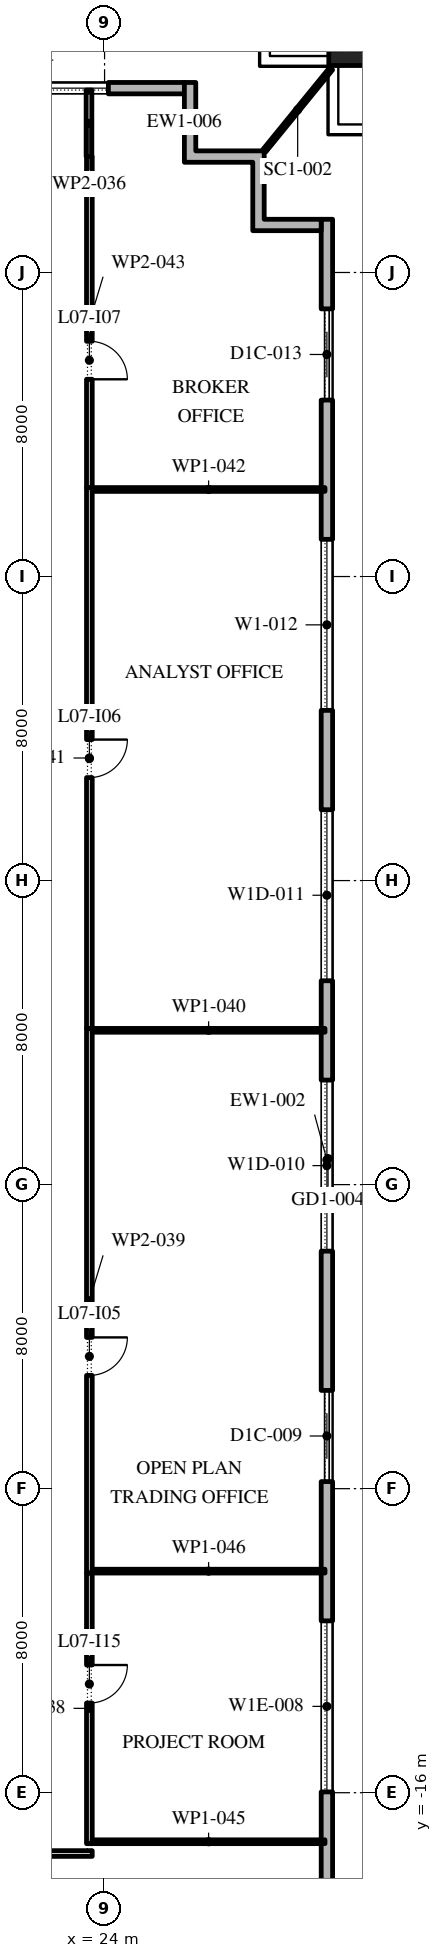
"""IFC4 building model, lengths in metres.
Left out: names, types, materials, properties, quantities, classifications, styles, units other than length and angle.
Written with IfcOpenShell. Run it as: python <this file> out.ifc"""

import sys

from ifc_helpers import new_model, si_unit, direction, frame, frame_2d, origin, origin_2d, place, context, subcontext, project, spatial, polyline, rectangle, outline, extrude, element, fill, save


model = new_model("IFC4")
c1 = context("Model", 3, precision=1e-05, world=origin(), true_north=direction((0.0, 1.0)))
c2 = subcontext(c1, "Body", "Model", "MODEL_VIEW")
j1 = project(units=[si_unit("LENGTHUNIT", "METRE"), si_unit("PLANEANGLEUNIT", "RADIAN")], contexts=[c1])
p1 = place(None, origin())
s1 = spatial("IfcSite", under=j1, at=p1, CompositionType="ELEMENT")
p2 = place(p1, origin())
s2 = spatial("IfcBuilding", under=s1, at=p2, CompositionType="ELEMENT")
p3 = place(p2, frame((0.0, 0.0, 39.6)))
s3 = spatial("IfcBuildingStorey", under=s2, at=p3, CompositionType="ELEMENT", Elevation=39.6)
p4 = place(p3, frame((30.6, 30.146, 0.0), z_axis=(0.0, 0.090540965689, 0.995892731941), x_axis=(-1.0, 0.0, 0.0)))
e1 = element("IfcColumn", 1, at=p4, inside=s3, PredefinedType="COLUMN", context=c2, shape_type="SweptSolid", body=[
    extrude(rectangle(XDim=1.4, YDim=1.4, at=origin_2d()), origin(), (0.0, 0.0, 1.0), 4.217),
])
p5 = place(p3, frame((29.85, -24.1, 0.0), z_axis=(0.0, 0.0, 1.0), x_axis=(0.0, 1.0, 0.0)))
e2 = element("IfcWall", 2, at=p5, inside=s3, PredefinedType="STANDARD", context=c2, shape_type="SweptSolid", body=[
    extrude(rectangle(XDim=49.5, YDim=0.3, at=frame_2d((24.75, 0.0))), origin(), (0.0, 0.0, 1.0), 4.0),
])
p6 = place(p5, frame((1.157, 0.0, 0.45)))
e3 = element("IfcOpeningElement", 3, at=p6, cuts=e2, PredefinedType="OPENING", context=c2, shape_type="SweptSolid", body=[
    extrude(rectangle(XDim=4.5, YDim=3.05, at=frame_2d((2.25, 1.525))), frame((0.0, 0.16, 0.0), z_axis=(0.0, -1.0, 0.0), x_axis=(1.0, 0.0, 0.0)), (0.0, 0.0, 1.0), 0.32),
])
p7 = place(p5, frame((8.121, 0.0, 0.45)))
e4 = element("IfcOpeningElement", 4, at=p7, cuts=e2, PredefinedType="OPENING", context=c2, shape_type="SweptSolid", body=[
    extrude(rectangle(XDim=4.5, YDim=2.825, at=frame_2d((2.25, 1.413))), frame((0.0, 0.16, 0.0), z_axis=(0.0, -1.0, 0.0), x_axis=(1.0, 0.0, 0.0)), (0.0, 0.0, 1.0), 0.32),
])
p8 = place(p5, frame((16.286, 0.0, 0.0)))
e5 = element("IfcOpeningElement", 5, at=p8, cuts=e2, PredefinedType="OPENING", context=c2, shape_type="SweptSolid", body=[
    extrude(rectangle(XDim=2.4, YDim=3.325, at=frame_2d((1.2, 1.663))), frame((0.0, 0.16, 0.0), z_axis=(0.0, -1.0, 0.0), x_axis=(1.0, 0.0, 0.0)), (0.0, 0.0, 1.0), 0.32),
])
p9 = place(p5, frame((22.35, 0.0, 0.45)))
e6 = element("IfcOpeningElement", 6, at=p9, cuts=e2, PredefinedType="OPENING", context=c2, shape_type="SweptSolid", body=[
    extrude(rectangle(XDim=4.5, YDim=2.875, at=frame_2d((2.25, 1.438))), frame((0.0, 0.16, 0.0), z_axis=(0.0, -1.0, 0.0), x_axis=(1.0, 0.0, 0.0)), (0.0, 0.0, 1.0), 0.32),
])
p10 = place(p5, frame((29.464, 0.0, 0.45)))
e7 = element("IfcOpeningElement", 7, at=p10, cuts=e2, PredefinedType="OPENING", context=c2, shape_type="SweptSolid", body=[
    extrude(rectangle(XDim=4.5, YDim=2.875, at=frame_2d((2.25, 1.438))), frame((0.0, 0.16, 0.0), z_axis=(0.0, -1.0, 0.0), x_axis=(1.0, 0.0, 0.0)), (0.0, 0.0, 1.0), 0.32),
])
p11 = place(p5, frame((36.579, 0.0, 0.45)))
e8 = element("IfcOpeningElement", 8, at=p11, cuts=e2, PredefinedType="OPENING", context=c2, shape_type="SweptSolid", body=[
    extrude(rectangle(XDim=4.5, YDim=3.05, at=frame_2d((2.25, 1.525))), frame((0.0, 0.16, 0.0), z_axis=(0.0, -1.0, 0.0), x_axis=(1.0, 0.0, 0.0)), (0.0, 0.0, 1.0), 0.32),
])
p12 = place(p5, frame((44.743, 0.0, 0.0)))
e9 = element("IfcOpeningElement", 9, at=p12, cuts=e2, PredefinedType="OPENING", context=c2, shape_type="SweptSolid", body=[
    extrude(rectangle(XDim=2.4, YDim=3.325, at=frame_2d((1.2, 1.663))), frame((0.0, 0.16, 0.0), z_axis=(0.0, -1.0, 0.0), x_axis=(1.0, 0.0, 0.0)), (0.0, 0.0, 1.0), 0.32),
])
p13 = place(p3, frame((26.1, 28.85, 0.0), z_axis=(0.0, 0.0, 1.0), x_axis=(-1.0, 0.0, 0.0)))
e10 = element("IfcWall", 10, at=p13, inside=s3, PredefinedType="STANDARD", context=c2, shape_type="SweptSolid", body=[
    extrude(rectangle(XDim=52.5, YDim=0.3, at=frame_2d((26.25, 0.0))), origin(), (0.0, 0.0, 1.0), 4.0),
])
p14 = place(p13, frame((2.0, 0.0, 0.45)))
e11 = element("IfcOpeningElement", 11, at=p14, cuts=e10, PredefinedType="OPENING", context=c2, shape_type="SweptSolid", body=[
    extrude(rectangle(XDim=4.5, YDim=3.05, at=frame_2d((2.25, 1.525))), frame((0.0, 0.16, 0.0), z_axis=(0.0, -1.0, 0.0), x_axis=(1.0, 0.0, 0.0)), (0.0, 0.0, 1.0), 0.32),
])
p15 = place(p13, frame((10.65, 0.0, 0.45)))
e12 = element("IfcOpeningElement", 12, at=p15, cuts=e10, PredefinedType="OPENING", context=c2, shape_type="SweptSolid", body=[
    extrude(rectangle(XDim=4.5, YDim=3.05, at=frame_2d((2.25, 1.525))), frame((0.0, 0.16, 0.0), z_axis=(0.0, -1.0, 0.0), x_axis=(1.0, 0.0, 0.0)), (0.0, 0.0, 1.0), 0.32),
])
p16 = place(p13, frame((20.5, 0.0, 0.0)))
e13 = element("IfcOpeningElement", 13, at=p16, cuts=e10, PredefinedType="OPENING", context=c2, shape_type="SweptSolid", body=[
    extrude(rectangle(XDim=2.4, YDim=3.5, at=frame_2d((1.2, 1.75))), frame((0.0, 0.16, 0.0), z_axis=(0.0, -1.0, 0.0), x_axis=(1.0, 0.0, 0.0)), (0.0, 0.0, 1.0), 0.32),
])
p17 = place(p13, frame((28.25, 0.0, 0.45)))
e14 = element("IfcOpeningElement", 14, at=p17, cuts=e10, PredefinedType="OPENING", context=c2, shape_type="SweptSolid", body=[
    extrude(rectangle(XDim=4.5, YDim=3.05, at=frame_2d((2.25, 1.525))), frame((0.0, 0.16, 0.0), z_axis=(0.0, -1.0, 0.0), x_axis=(1.0, 0.0, 0.0)), (0.0, 0.0, 1.0), 0.32),
])
p18 = place(p13, frame((37.05, 0.0, 0.45)))
e15 = element("IfcOpeningElement", 15, at=p18, cuts=e10, PredefinedType="OPENING", context=c2, shape_type="SweptSolid", body=[
    extrude(rectangle(XDim=4.5, YDim=3.05, at=frame_2d((2.25, 1.525))), frame((0.0, 0.16, 0.0), z_axis=(0.0, -1.0, 0.0), x_axis=(1.0, 0.0, 0.0)), (0.0, 0.0, 1.0), 0.32),
])
p19 = place(p13, frame((45.85, 0.0, 0.45)))
e16 = element("IfcOpeningElement", 16, at=p19, cuts=e10, PredefinedType="OPENING", context=c2, shape_type="SweptSolid", body=[
    extrude(rectangle(XDim=4.5, YDim=3.05, at=frame_2d((2.25, 1.525))), frame((0.0, 0.16, 0.0), z_axis=(0.0, -1.0, 0.0), x_axis=(1.0, 0.0, 0.0)), (0.0, 0.0, 1.0), 0.32),
])
p20 = place(p3, origin())
e17 = element("IfcWall", 17, at=p20, inside=s3, PredefinedType="STANDARD", context=c2, shape_type="SweptSolid", body=[
    extrude(outline(polyline([(27.9, 26.9), (26.1, 26.9), (26.1, 29.0), (26.4, 29.0), (26.4, 27.2), (28.2, 27.2), (28.2, 25.4), (29.7, 25.4), (29.7, 25.1), (27.9, 25.1), (27.9, 26.9)])), origin(), (0.0, 0.0, 1.0), 4.0),
])
p21 = place(p3, frame((28.2, 27.2, -0.05), z_axis=(0.0, 0.0, 1.0), x_axis=(0.631639832541, 0.775261969883, 0.0)))
e18 = element("IfcWall", 18, at=p21, inside=s3, PredefinedType="STANDARD", context=c2, shape_type="SweptSolid", body=[
    extrude(rectangle(XDim=2.79, YDim=0.1, at=frame_2d((1.395, 0.0))), origin(), (0.0, 0.0, 1.0), 4.05),
])
p22 = place(p3, frame((23.59, 28.8, 0.0), z_axis=(0.0, 0.0, 1.0), x_axis=(0.0, -1.0, 0.0)))
e19 = element("IfcWall", 19, at=p22, inside=s3, PredefinedType="PARTITIONING", context=c2, shape_type="SweptSolid", body=[
    extrude(rectangle(XDim=1.75, YDim=0.15, at=frame_2d((0.875, 0.0))), origin(), (0.0, 0.0, 1.0), 4.0),
])
p23 = place(p3, frame((23.675, -17.6, 0.0), z_axis=(0.0, 0.0, 1.0), x_axis=(-1.0, 0.0, 0.0)))
e20 = element("IfcWall", 20, at=p23, inside=s3, PredefinedType="PARTITIONING", context=c2, shape_type="SweptSolid", body=[
    extrude(rectangle(XDim=8.675, YDim=0.15, at=frame_2d((4.337, 0.0))), origin(), (0.0, 0.0, 1.0), 4.0),
])
p24 = place(p23, frame((3.775, 0.0, 0.0)))
e21 = element("IfcOpeningElement", 21, at=p24, cuts=e20, PredefinedType="OPENING", context=c2, shape_type="SweptSolid", body=[
    extrude(rectangle(XDim=1.0, YDim=2.1, at=frame_2d((0.5, 1.05))), frame((0.0, 0.085, 0.0), z_axis=(0.0, -1.0, 0.0), x_axis=(1.0, 0.0, 0.0)), (0.0, 0.0, 1.0), 0.17),
])
p25 = place(p3, frame((23.6, -10.22, 0.0), z_axis=(0.0, 0.0, 1.0), x_axis=(0.0, -1.0, 0.0)))
e22 = element("IfcWall", 22, at=p25, inside=s3, PredefinedType="PARTITIONING", context=c2, shape_type="SweptSolid", body=[
    extrude(rectangle(XDim=7.12, YDim=0.15, at=frame_2d((3.56, 0.0))), origin(), (0.0, 0.0, 1.0), 4.0),
])
p26 = place(p25, frame((2.42, 0.0, 0.0)))
e23 = element("IfcOpeningElement", 23, at=p26, cuts=e22, PredefinedType="OPENING", context=c2, shape_type="SweptSolid", body=[
    extrude(rectangle(XDim=1.0, YDim=2.1, at=frame_2d((0.5, 1.05))), frame((0.0, 0.085, 0.0), z_axis=(0.0, -1.0, 0.0), x_axis=(1.0, 0.0, 0.0)), (0.0, 0.0, 1.0), 0.17),
])
p27 = place(p3, frame((23.6, 4.11, 0.0), z_axis=(0.0, 0.0, 1.0), x_axis=(0.0, -1.0, 0.0)))
e24 = element("IfcWall", 24, at=p27, inside=s3, PredefinedType="PARTITIONING", context=c2, shape_type="SweptSolid", body=[
    extrude(rectangle(XDim=14.33, YDim=0.15, at=frame_2d((7.165, 0.0))), origin(), (0.0, 0.0, 1.0), 4.0),
])
p28 = place(p27, frame((8.13, 0.0, 0.0)))
e25 = element("IfcOpeningElement", 25, at=p28, cuts=e24, PredefinedType="OPENING", context=c2, shape_type="SweptSolid", body=[
    extrude(rectangle(XDim=1.0, YDim=2.1, at=frame_2d((0.5, 1.05))), frame((0.0, 0.085, 0.0), z_axis=(0.0, -1.0, 0.0), x_axis=(1.0, 0.0, 0.0)), (0.0, 0.0, 1.0), 0.17),
])
p29 = place(p3, frame((23.675, 4.06, 0.0), z_axis=(0.0, 0.0, 1.0), x_axis=(1.0, 0.0, 0.0)))
e26 = element("IfcWall", 26, at=p29, inside=s3, PredefinedType="PARTITIONING", context=c2, shape_type="SweptSolid", body=[
    extrude(rectangle(XDim=6.125, YDim=0.1, at=frame_2d((3.062, 0.0))), origin(), (0.0, 0.0, 1.0), 4.0),
])
p30 = place(p3, frame((23.6, 18.34, 0.0), z_axis=(0.0, 0.0, 1.0), x_axis=(0.0, -1.0, 0.0)))
e27 = element("IfcWall", 27, at=p30, inside=s3, PredefinedType="PARTITIONING", context=c2, shape_type="SweptSolid", body=[
    extrude(rectangle(XDim=14.23, YDim=0.15, at=frame_2d((7.115, 0.0))), origin(), (0.0, 0.0, 1.0), 4.0),
])
p31 = place(p30, frame((6.63, 0.0, 0.0)))
e28 = element("IfcOpeningElement", 28, at=p31, cuts=e27, PredefinedType="OPENING", context=c2, shape_type="SweptSolid", body=[
    extrude(rectangle(XDim=1.0, YDim=2.1, at=frame_2d((0.5, 1.05))), frame((0.0, 0.085, 0.0), z_axis=(0.0, -1.0, 0.0), x_axis=(1.0, 0.0, 0.0)), (0.0, 0.0, 1.0), 0.17),
])
p32 = place(p3, frame((23.675, 18.29, 0.0), z_axis=(0.0, 0.0, 1.0), x_axis=(1.0, 0.0, 0.0)))
e29 = element("IfcWall", 29, at=p32, inside=s3, PredefinedType="PARTITIONING", context=c2, shape_type="SweptSolid", body=[
    extrude(rectangle(XDim=6.125, YDim=0.1, at=frame_2d((3.062, 0.0))), origin(), (0.0, 0.0, 1.0), 4.0),
])
p33 = place(p3, frame((23.6, 27.05, 0.0), z_axis=(0.0, 0.0, 1.0), x_axis=(0.0, -1.0, 0.0)))
e30 = element("IfcWall", 30, at=p33, inside=s3, PredefinedType="PARTITIONING", context=c2, shape_type="SweptSolid", body=[
    extrude(rectangle(XDim=8.71, YDim=0.15, at=frame_2d((4.355, 0.0))), origin(), (0.0, 0.0, 1.0), 4.0),
])
p34 = place(p33, frame((4.86, 0.0, 0.0)))
e31 = element("IfcOpeningElement", 31, at=p34, cuts=e30, PredefinedType="OPENING", context=c2, shape_type="SweptSolid", body=[
    extrude(rectangle(XDim=1.0, YDim=2.1, at=frame_2d((0.5, 1.05))), frame((0.0, 0.085, 0.0), z_axis=(0.0, -1.0, 0.0), x_axis=(1.0, 0.0, 0.0)), (0.0, 0.0, 1.0), 0.17),
])
for number, where, z_axis, x_axis in (
    (32, (29.8, -17.29, 0.0), (0.0, 0.0, 1.0), (-1.0, 0.0, 0.0)),
    (33, (29.8, -10.17, 0.0), (0.0, 0.0, 1.0), (-1.0, 0.0, 0.0)),
):
    element("IfcWall", number, at=place(p3, frame(where, z_axis=z_axis, x_axis=x_axis)), inside=s3, PredefinedType="PARTITIONING", context=c2, shape_type="SweptSolid", body=[
        extrude(rectangle(XDim=6.125, YDim=0.1, at=frame_2d((3.062, 0.0))), origin(), (0.0, 0.0, 1.0), 4.0),
    ])
p35 = place(p7, origin())
e34 = element("IfcWindow", 34, at=p35, inside=s3, PartitioningType="DOUBLE_PANEL_VERTICAL", PredefinedType="WINDOW", context=c2, shape_type="SweptSolid", body=[
    extrude(rectangle(XDim=4.5, YDim=2.825, at=frame_2d((2.25, 1.413))), frame((0.0, 0.03, 0.0), z_axis=(0.0, -1.0, 0.0), x_axis=(1.0, 0.0, 0.0)), (0.0, 0.0, 1.0), 0.06),
])
fill(e4, e34)
p36 = place(p8, origin())
e35 = element("IfcDoor", 35, at=p36, inside=s3, OperationType="DOUBLE_DOOR_SLIDING", PredefinedType="DOOR", context=c2, shape_type="SweptSolid", body=[
    extrude(rectangle(XDim=2.4, YDim=3.325, at=frame_2d((1.2, 1.663))), frame((0.0, 0.025, 0.0), z_axis=(0.0, -1.0, 0.0), x_axis=(1.0, 0.0, 0.0)), (0.0, 0.0, 1.0), 0.05),
])
fill(e5, e35)
p37 = place(p9, origin())
e36 = element("IfcWindow", 36, at=p37, inside=s3, PartitioningType="DOUBLE_PANEL_VERTICAL", PredefinedType="WINDOW", context=c2, shape_type="SweptSolid", body=[
    extrude(rectangle(XDim=4.5, YDim=2.875, at=frame_2d((2.25, 1.438))), frame((0.0, 0.03, 0.0), z_axis=(0.0, -1.0, 0.0), x_axis=(1.0, 0.0, 0.0)), (0.0, 0.0, 1.0), 0.06),
])
fill(e6, e36)
p38 = place(p10, origin())
e37 = element("IfcWindow", 37, at=p38, inside=s3, PartitioningType="DOUBLE_PANEL_VERTICAL", PredefinedType="WINDOW", context=c2, shape_type="SweptSolid", body=[
    extrude(rectangle(XDim=4.5, YDim=2.875, at=frame_2d((2.25, 1.438))), frame((0.0, 0.03, 0.0), z_axis=(0.0, -1.0, 0.0), x_axis=(1.0, 0.0, 0.0)), (0.0, 0.0, 1.0), 0.06),
])
fill(e7, e37)
p39 = place(p11, origin())
e38 = element("IfcWindow", 38, at=p39, inside=s3, PartitioningType="DOUBLE_PANEL_VERTICAL", PredefinedType="WINDOW", context=c2, shape_type="SweptSolid", body=[
    extrude(rectangle(XDim=4.5, YDim=3.05, at=frame_2d((2.25, 1.525))), frame((0.0, 0.03, 0.0), z_axis=(0.0, -1.0, 0.0), x_axis=(1.0, 0.0, 0.0)), (0.0, 0.0, 1.0), 0.06),
])
fill(e8, e38)
p40 = place(p12, origin())
e39 = element("IfcDoor", 39, at=p40, inside=s3, OperationType="DOUBLE_DOOR_SLIDING", PredefinedType="DOOR", context=c2, shape_type="SweptSolid", body=[
    extrude(rectangle(XDim=2.4, YDim=3.325, at=frame_2d((1.2, 1.663))), frame((0.0, 0.025, 0.0), z_axis=(0.0, -1.0, 0.0), x_axis=(1.0, 0.0, 0.0)), (0.0, 0.0, 1.0), 0.05),
])
fill(e9, e39)
p41 = place(p14, origin())
e40 = element("IfcWindow", 40, at=p41, inside=s3, PartitioningType="DOUBLE_PANEL_VERTICAL", PredefinedType="WINDOW", context=c2, shape_type="SweptSolid", body=[
    extrude(rectangle(XDim=4.5, YDim=3.05, at=frame_2d((2.25, 1.525))), frame((0.0, 0.03, 0.0), z_axis=(0.0, -1.0, 0.0), x_axis=(1.0, 0.0, 0.0)), (0.0, 0.0, 1.0), 0.06),
])
fill(e11, e40)
p42 = place(p28, origin())
e41 = element("IfcDoor", 41, at=p42, inside=s3, OperationType="SINGLE_SWING_RIGHT", PredefinedType="DOOR", context=c2, shape_type="SweptSolid", body=[
    extrude(rectangle(XDim=1.0, YDim=2.1, at=frame_2d((0.5, 1.05))), frame((0.0, 0.025, 0.0), z_axis=(0.0, -1.0, 0.0), x_axis=(1.0, 0.0, 0.0)), (0.0, 0.0, 1.0), 0.05),
])
fill(e25, e41)
p43 = place(p31, origin())
e42 = element("IfcDoor", 42, at=p43, inside=s3, OperationType="SINGLE_SWING_RIGHT", PredefinedType="DOOR", context=c2, shape_type="SweptSolid", body=[
    extrude(rectangle(XDim=1.0, YDim=2.1, at=frame_2d((0.5, 1.05))), frame((0.0, 0.025, 0.0), z_axis=(0.0, -1.0, 0.0), x_axis=(1.0, 0.0, 0.0)), (0.0, 0.0, 1.0), 0.05),
])
fill(e28, e42)
p44 = place(p34, origin())
e43 = element("IfcDoor", 43, at=p44, inside=s3, OperationType="SINGLE_SWING_LEFT", PredefinedType="DOOR", context=c2, shape_type="SweptSolid", body=[
    extrude(rectangle(XDim=1.0, YDim=2.1, at=frame_2d((0.5, 1.05))), frame((0.0, 0.025, 0.0), z_axis=(0.0, -1.0, 0.0), x_axis=(1.0, 0.0, 0.0)), (0.0, 0.0, 1.0), 0.05),
])
fill(e31, e43)
p45 = place(p26, origin())
e44 = element("IfcDoor", 44, at=p45, inside=s3, OperationType="SINGLE_SWING_RIGHT", PredefinedType="DOOR", context=c2, shape_type="SweptSolid", body=[
    extrude(rectangle(XDim=1.0, YDim=2.1, at=frame_2d((0.5, 1.05))), frame((0.0, 0.025, 0.0), z_axis=(0.0, -1.0, 0.0), x_axis=(1.0, 0.0, 0.0)), (0.0, 0.0, 1.0), 0.05),
])
fill(e23, e44)
save(model, sys.argv[1])
